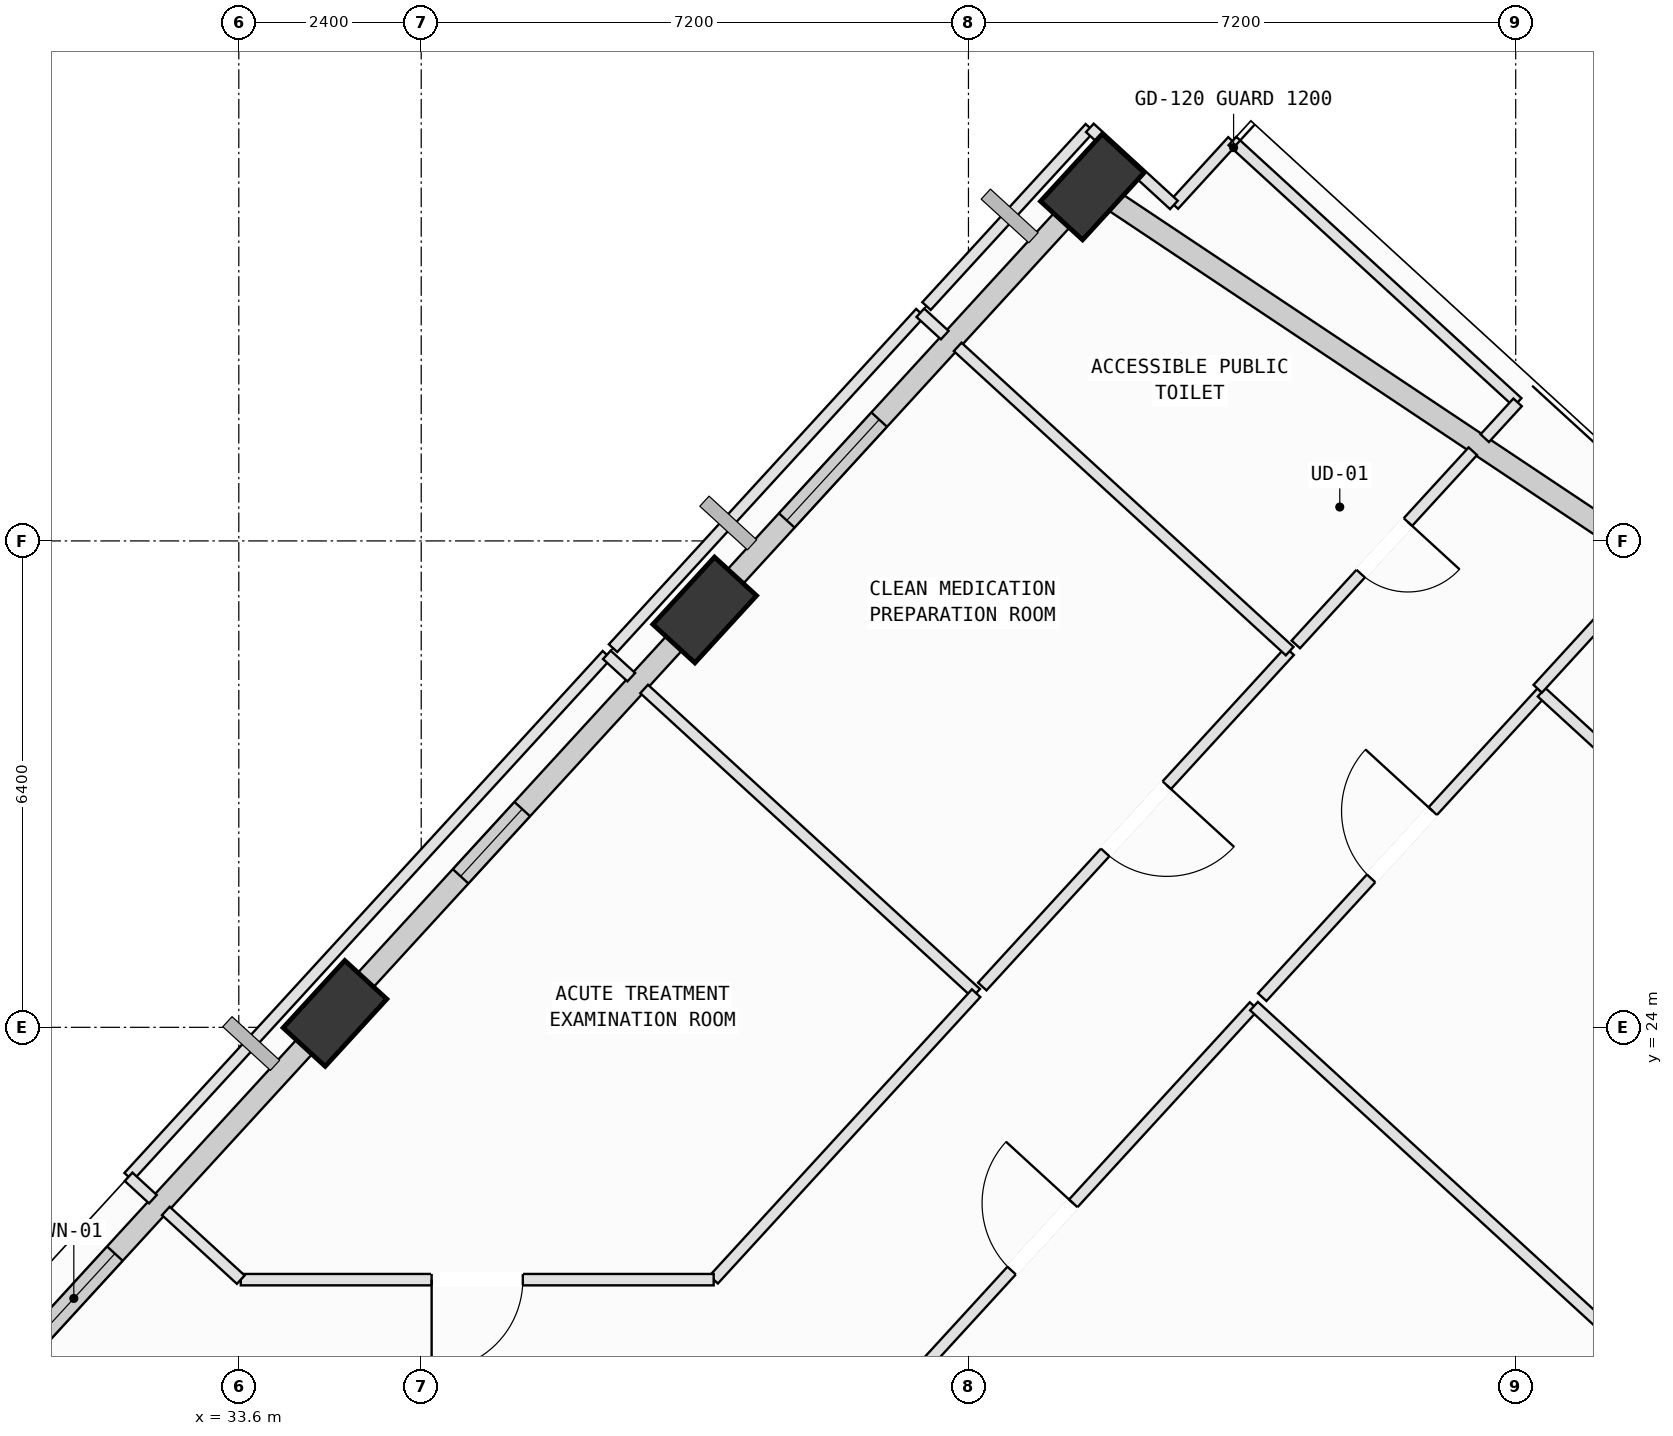
"""IFC4 building model, lengths in metres.
Left out: names, types, materials, properties, quantities, classifications, styles, units other than length and angle.
Written with IfcOpenShell. Run it as: python <this file> out.ifc"""

import sys

from ifc_helpers import new_model, si_unit, direction, frame, frame_2d, origin, origin_2d, place, context, subcontext, project, spatial, rectangle, extrude, element, fill, save


model = new_model("IFC4")
c1 = context("Model", 3, precision=1e-05, world=origin(), true_north=direction((0.0, 1.0)))
c2 = subcontext(c1, "Body", "Model", "MODEL_VIEW")
j1 = project(units=[si_unit("LENGTHUNIT", "METRE"), si_unit("PLANEANGLEUNIT", "RADIAN")], contexts=[c1])
p1 = place(None, origin())
s1 = spatial("IfcSite", under=j1, at=p1, CompositionType="ELEMENT")
p2 = place(p1, origin())
s2 = spatial("IfcBuilding", under=s1, at=p2, CompositionType="ELEMENT")
p3 = place(p2, frame((0.0, 0.0, 227.2)))
s3 = spatial("IfcBuildingStorey", under=s2, at=p3, CompositionType="ELEMENT", Elevation=227.2)
p4 = place(p3, frame((44.83, 35.058, 0.002), z_axis=(-0.042801019113, 0.046093405199, 0.998019774734), x_axis=(0.005619625487, -0.9989082731, 0.046375443311)))
e1 = element("IfcColumn", 1, at=p4, inside=s3, PredefinedType="COLUMN", context=c2, shape_type="SweptSolid", body=[
    extrude(rectangle(XDim=1.2, YDim=0.75, at=origin_2d()), origin(), (0.0, 0.0, 1.0), 4.004),
])
p5 = place(p3, frame((39.73, 29.491, 0.002), z_axis=(-0.019661240115, 0.02527873729, 0.999487078995), x_axis=(-0.080866298799, -0.996445261774, 0.023611056886)))
e2 = element("IfcColumn", 2, at=p5, inside=s3, PredefinedType="COLUMN", context=c2, shape_type="SweptSolid", body=[
    extrude(rectangle(XDim=1.2, YDim=0.75, at=origin_2d()), origin(), (0.0, 0.0, 1.0), 3.998),
])
p6 = place(p3, frame((34.865, 24.183, 0.002), z_axis=(0.002565781789, 0.005253743664, 0.999982907325), x_axis=(-0.930601204641, -0.366009310919, 0.004310712404)))
e3 = element("IfcColumn", 3, at=p6, inside=s3, PredefinedType="COLUMN", context=c2, shape_type="SweptSolid", body=[
    extrude(rectangle(XDim=1.2, YDim=0.75, at=origin_2d()), origin(), (0.0, 0.0, 1.0), 3.996),
])
p7 = place(p3, frame((45.058, 34.906, 0.0), z_axis=(0.0, 0.0, 1.0), x_axis=(0.831863197992, -0.554980738249, 0.0)))
e4 = element("IfcWall", 4, at=p7, inside=s3, PredefinedType="SOLIDWALL", context=c2, shape_type="SweptSolid", body=[
    extrude(rectangle(XDim=9.036, YDim=0.28, at=frame_2d((4.518, 0.0))), origin(), (0.0, 0.0, 1.0), 3.265),
])
p8 = place(p3, frame((40.002, 29.789, 0.0), z_axis=(0.0, 0.0, 1.0), x_axis=(0.675590903353, 0.737276699283, 0.0)))
e5 = element("IfcWall", 5, at=p8, inside=s3, PredefinedType="SOLIDWALL", context=c2, shape_type="SweptSolid", body=[
    extrude(rectangle(XDim=6.78, YDim=0.28, at=frame_2d((3.39, 0.0))), origin(), (0.0, 0.0, 1.0), 3.165),
])
p9 = place(p8, frame((1.195, 0.0, 0.75)))
e6 = element("IfcOpeningElement", 6, at=p9, cuts=e5, PredefinedType="OPENING", context=c2, shape_type="SweptSolid", body=[
    extrude(rectangle(XDim=1.8, YDim=2.05, at=frame_2d((0.9, 1.025))), frame((0.0, 0.15, 0.0), z_axis=(0.0, -1.0, 0.0), x_axis=(1.0, 0.0, 0.0)), (0.0, 0.0, 1.0), 0.3),
])
p10 = place(p3, frame((35.142, 24.484, 0.0), z_axis=(0.0, 0.0, 1.0), x_axis=(0.675579726408, 0.737286940931, 0.0)))
e7 = element("IfcWall", 7, at=p10, inside=s3, PredefinedType="SOLIDWALL", context=c2, shape_type="SweptSolid", body=[
    extrude(rectangle(XDim=6.409, YDim=0.28, at=frame_2d((3.205, 0.0))), origin(), (0.0, 0.0, 1.0), 3.265),
])
p11 = place(p10, frame((2.038, 0.0, 0.75)))
e8 = element("IfcOpeningElement", 8, at=p11, cuts=e7, PredefinedType="OPENING", context=c2, shape_type="SweptSolid", body=[
    extrude(rectangle(XDim=1.2, YDim=1.75, at=frame_2d((0.6, 0.875))), frame((0.0, 0.15, 0.0), z_axis=(0.0, -1.0, 0.0), x_axis=(1.0, 0.0, 0.0)), (0.0, 0.0, 1.0), 0.3),
])
p12 = place(p3, frame((30.444, 19.358, 0.0), z_axis=(0.0, 0.0, 1.0), x_axis=(0.675589973943, 0.737277550931, 0.0)))
e9 = element("IfcWall", 9, at=p12, inside=s3, PredefinedType="SOLIDWALL", context=c2, shape_type="SweptSolid", body=[
    extrude(rectangle(XDim=6.158, YDim=0.28, at=frame_2d((3.079, 0.0))), origin(), (0.0, 0.0, 1.0), 3.265),
])
p13 = place(p12, frame((0.658, 0.0, 0.75)))
e10 = element("IfcOpeningElement", 10, at=p13, cuts=e9, PredefinedType="OPENING", context=c2, shape_type="SweptSolid", body=[
    extrude(rectangle(XDim=1.6, YDim=1.95, at=frame_2d((0.8, 0.975))), frame((0.0, 0.15, 0.0), z_axis=(0.0, -1.0, 0.0), x_axis=(1.0, 0.0, 0.0)), (0.0, 0.0, 1.0), 0.3),
])
p14 = place(p3, frame((41.39, 18.204, 0.0), z_axis=(0.0, 0.0, 1.0), x_axis=(0.67562131305, 0.737248832724, 0.0)))
e11 = element("IfcWall", 11, at=p14, inside=s3, PredefinedType="PARTITIONING", context=c2, shape_type="SweptSolid", body=[
    extrude(rectangle(XDim=8.24, YDim=0.15, at=frame_2d((4.12, 0.0))), origin(), (0.0, 0.0, 1.0), 3.78),
])
p15 = place(p14, frame((3.52, 0.0, 0.0)))
e12 = element("IfcOpeningElement", 12, at=p15, cuts=e11, PredefinedType="OPENING", context=c2, shape_type="SweptSolid", body=[
    extrude(rectangle(XDim=1.2, YDim=2.15, at=frame_2d((0.6, 1.075))), frame((0.0, 0.085, 0.0), z_axis=(0.0, -1.0, 0.0), x_axis=(1.0, 0.0, 0.0)), (0.0, 0.0, 1.0), 0.17),
])
p16 = place(p3, frame((46.957, 24.279, 0.0), z_axis=(0.0, 0.0, 1.0), x_axis=(0.737309503426, -0.675555102237, 0.0)))
e13 = element("IfcWall", 13, at=p16, inside=s3, PredefinedType="PARTITIONING", context=c2, shape_type="SweptSolid", body=[
    extrude(rectangle(XDim=11.935, YDim=0.15, at=frame_2d((5.968, 0.0))), origin(), (0.0, 0.0, 1.0), 3.78),
])
p17 = place(p3, frame((47.065, 24.397, 0.0), z_axis=(0.0, 0.0, 1.0), x_axis=(0.675653505822, 0.737219329691, 0.0)))
e14 = element("IfcWall", 14, at=p17, inside=s3, PredefinedType="PARTITIONING", context=c2, shape_type="SweptSolid", body=[
    extrude(rectangle(XDim=5.441, YDim=0.15, at=frame_2d((2.72, 0.0))), origin(), (0.0, 0.0, 1.0), 3.78),
])
p18 = place(p17, frame((2.12, 0.0, 0.0)))
e15 = element("IfcOpeningElement", 15, at=p18, cuts=e14, PredefinedType="OPENING", context=c2, shape_type="SweptSolid", body=[
    extrude(rectangle(XDim=1.2, YDim=2.15, at=frame_2d((0.6, 1.075))), frame((0.0, 0.085, 0.0), z_axis=(0.0, -1.0, 0.0), x_axis=(1.0, 0.0, 0.0)), (0.0, 0.0, 1.0), 0.17),
])
p19 = place(p3, frame((50.741, 28.408, 0.0), z_axis=(0.0, 0.0, 1.0), x_axis=(0.737225137983, -0.675647168221, 0.0)))
e16 = element("IfcWall", 16, at=p19, inside=s3, PredefinedType="PARTITIONING", context=c2, shape_type="SweptSolid", body=[
    extrude(rectangle(XDim=10.134, YDim=0.15, at=frame_2d((5.067, 0.0))), origin(), (0.0, 0.0, 1.0), 3.78),
])
p20 = place(p19, frame((4.637, 0.0, 0.0)))
e17 = element("IfcOpeningElement", 17, at=p20, cuts=e16, PredefinedType="OPENING", context=c2, shape_type="SweptSolid", body=[
    extrude(rectangle(XDim=0.86, YDim=2.06, at=frame_2d((0.43, 1.03))), frame((0.0, 0.085, 0.0), z_axis=(0.0, -1.0, 0.0), x_axis=(1.0, 0.0, 0.0)), (0.0, 0.0, 1.0), 0.17),
])
p21 = place(p3, frame((32.15, 22.033, 0.0), z_axis=(0.0, 0.0, 1.0), x_axis=(0.675585759027, 0.737281413166, 0.0)))
e18 = element("IfcWall", 18, at=p21, inside=s3, PredefinedType="PARTITIONING", context=c2, shape_type="SweptSolid", body=[
    extrude(rectangle(XDim=9.315, YDim=0.15, at=frame_2d((4.658, 0.0))), origin(), (0.0, 0.0, 1.0), 3.78),
])
p22 = place(p3, frame((38.443, 28.901, 0.0), z_axis=(0.0, 0.0, 1.0), x_axis=(0.737293871703, -0.675572162504, 0.0)))
e19 = element("IfcWall", 19, at=p22, inside=s3, PredefinedType="PARTITIONING", context=c2, shape_type="SweptSolid", body=[
    extrude(rectangle(XDim=0.435, YDim=0.15, at=frame_2d((0.218, 0.0))), origin(), (0.0, 0.0, 1.0), 3.78),
])
p23 = place(p3, frame((38.933, 28.452, 0.0), z_axis=(0.0, 0.0, 1.0), x_axis=(0.737237948412, -0.675633189993, 0.0)))
e20 = element("IfcWall", 20, at=p23, inside=s3, PredefinedType="PARTITIONING", context=c2, shape_type="SweptSolid", body=[
    extrude(rectangle(XDim=5.925, YDim=0.15, at=frame_2d((2.962, 0.0))), origin(), (0.0, 0.0, 1.0), 3.78),
])
p24 = place(p3, frame((43.301, 24.449, 0.0), z_axis=(0.0, 0.0, 1.0), x_axis=(-0.675529956825, -0.737332541959, 0.0)))
e21 = element("IfcWall", 21, at=p24, inside=s3, PredefinedType="PARTITIONING", context=c2, shape_type="SweptSolid", body=[
    extrude(rectangle(XDim=5.112, YDim=0.15, at=frame_2d((2.556, 0.0))), origin(), (0.0, 0.0, 1.0), 3.78),
])
p25 = place(p3, frame((39.848, 20.68, 0.0), z_axis=(0.0, 0.0, 1.0), x_axis=(-1.0, 0.0, 0.0)))
e22 = element("IfcWall", 22, at=p25, inside=s3, PredefinedType="PARTITIONING", context=c2, shape_type="SweptSolid", body=[
    extrude(rectangle(XDim=6.222, YDim=0.15, at=frame_2d((3.111, 0.0))), origin(), (0.0, 0.0, 1.0), 3.78),
])
p26 = place(p25, frame((2.511, 0.0, 0.0)))
e23 = element("IfcOpeningElement", 23, at=p26, cuts=e22, PredefinedType="OPENING", context=c2, shape_type="SweptSolid", body=[
    extrude(rectangle(XDim=1.2, YDim=2.15, at=frame_2d((0.6, 1.075))), frame((0.0, 0.085, 0.0), z_axis=(0.0, -1.0, 0.0), x_axis=(1.0, 0.0, 0.0)), (0.0, 0.0, 1.0), 0.17),
])
p27 = place(p3, frame((33.626, 20.68, 0.0), z_axis=(0.0, 0.0, 1.0), x_axis=(-0.737101110808, 0.675782474207, 0.0)))
e24 = element("IfcWall", 24, at=p27, inside=s3, PredefinedType="PARTITIONING", context=c2, shape_type="SweptSolid", body=[
    extrude(rectangle(XDim=1.338, YDim=0.15, at=frame_2d((0.669, 0.0))), origin(), (0.0, 0.0, 1.0), 3.78),
])
p28 = place(p3, frame((32.47, 21.739, 0.0), z_axis=(0.0, 0.0, 1.0), x_axis=(-0.736524176438, 0.676411219246, 0.0)))
e25 = element("IfcWall", 25, at=p28, inside=s3, PredefinedType="PARTITIONING", context=c2, shape_type="SweptSolid", body=[
    extrude(rectangle(XDim=0.435, YDim=0.15, at=frame_2d((0.217, 0.0))), origin(), (0.0, 0.0, 1.0), 3.78),
])
p29 = place(p3, frame((47.426, 28.95, 0.0), z_axis=(0.0, 0.0, 1.0), x_axis=(-0.675619341334, -0.737250639617, 0.0)))
e26 = element("IfcWall", 26, at=p29, inside=s3, PredefinedType="PARTITIONING", context=c2, shape_type="SweptSolid", body=[
    extrude(rectangle(XDim=5.986, YDim=0.15, at=frame_2d((2.993, 0.0))), origin(), (0.0, 0.0, 1.0), 3.78),
])
p30 = place(p29, frame((2.393, 0.0, 0.0)))
e27 = element("IfcOpeningElement", 27, at=p30, cuts=e26, PredefinedType="OPENING", context=c2, shape_type="SweptSolid", body=[
    extrude(rectangle(XDim=1.2, YDim=2.15, at=frame_2d((0.6, 1.075))), frame((0.0, 0.085, 0.0), z_axis=(0.0, -1.0, 0.0), x_axis=(1.0, 0.0, 0.0)), (0.0, 0.0, 1.0), 0.17),
])
p31 = place(p3, frame((38.524, 28.989, 0.0), z_axis=(0.0, 0.0, 1.0), x_axis=(0.675510328169, 0.737350524878, 0.0)))
e28 = element("IfcWall", 28, at=p31, inside=s3, PredefinedType="PARTITIONING", context=c2, shape_type="SweptSolid", body=[
    extrude(rectangle(XDim=5.985, YDim=0.15, at=frame_2d((2.993, 0.0))), origin(), (0.0, 0.0, 1.0), 3.265),
])
p32 = place(p3, frame((42.567, 33.402, 0.0), z_axis=(0.0, 0.0, 1.0), x_axis=(0.737270493076, -0.675597676165, 0.0)))
e29 = element("IfcWall", 29, at=p32, inside=s3, PredefinedType="PARTITIONING", context=c2, shape_type="SweptSolid", body=[
    extrude(rectangle(XDim=0.436, YDim=0.15, at=frame_2d((0.218, 0.0))), origin(), (0.0, 0.0, 1.0), 3.78),
])
p33 = place(p3, frame((43.058, 32.953, 0.0), z_axis=(0.0, 0.0, 1.0), x_axis=(0.737237948412, -0.675633189993, 0.0)))
e30 = element("IfcWall", 30, at=p33, inside=s3, PredefinedType="PARTITIONING", context=c2, shape_type="SweptSolid", body=[
    extrude(rectangle(XDim=5.925, YDim=0.15, at=frame_2d((2.962, 0.0))), origin(), (0.0, 0.0, 1.0), 3.78),
])
p34 = place(p3, frame((45.903, 34.821, 0.0), z_axis=(0.0, 0.0, 1.0), x_axis=(0.675268831718, 0.737571694759, 0.0)))
e31 = element("IfcWall", 31, at=p34, inside=s3, PredefinedType="PARTITIONING", context=c2, shape_type="SweptSolid", body=[
    extrude(rectangle(XDim=1.14, YDim=0.15, at=frame_2d((0.57, 0.0))), origin(), (0.0, 0.0, 1.0), 3.78),
])
p35 = place(p3, frame((46.673, 35.662, 0.0), z_axis=(0.0, 0.0, 1.0), x_axis=(0.737162104538, -0.675715940046, 0.0)))
e32 = element("IfcWall", 32, at=p35, inside=s3, PredefinedType="PARTITIONING", context=c2, shape_type="SweptSolid", body=[
    extrude(rectangle(XDim=5.09, YDim=0.15, at=frame_2d((2.545, 0.0))), origin(), (0.0, 0.0, 1.0), 3.78),
])
p36 = place(p3, frame((50.425, 32.223, 0.0), z_axis=(0.0, 0.0, 1.0), x_axis=(-0.676087778805, -0.736821087748, 0.0)))
e33 = element("IfcWall", 33, at=p36, inside=s3, PredefinedType="PARTITIONING", context=c2, shape_type="SweptSolid", body=[
    extrude(rectangle(XDim=0.639, YDim=0.15, at=frame_2d((0.32, 0.0))), origin(), (0.0, 0.0, 1.0), 3.78),
])
p37 = place(p3, frame((49.836, 31.58, 0.0), z_axis=(0.0, 0.0, 1.0), x_axis=(-0.675519367859, -0.737342243227, 0.0)))
e34 = element("IfcWall", 34, at=p37, inside=s3, PredefinedType="PARTITIONING", context=c2, shape_type="SweptSolid", body=[
    extrude(rectangle(XDim=3.448, YDim=0.15, at=frame_2d((1.724, 0.0))), origin(), (0.0, 0.0, 1.0), 3.78),
])
p38 = place(p37, frame((1.264, 0.0, 0.0)))
e35 = element("IfcOpeningElement", 35, at=p38, cuts=e34, PredefinedType="OPENING", context=c2, shape_type="SweptSolid", body=[
    extrude(rectangle(XDim=0.92, YDim=2.1, at=frame_2d((0.46, 1.05))), frame((0.0, 0.085, 0.0), z_axis=(0.0, -1.0, 0.0), x_axis=(1.0, 0.0, 0.0)), (0.0, 0.0, 1.0), 0.17),
])
p39 = place(p3, frame((42.648, 33.49, 0.0), z_axis=(0.0, 0.0, 1.0), x_axis=(0.675658589074, 0.737214670914, 0.0)))
e36 = element("IfcWall", 36, at=p39, inside=s3, PredefinedType="PARTITIONING", context=c2, shape_type="SweptSolid", body=[
    extrude(rectangle(XDim=3.181, YDim=0.15, at=frame_2d((1.59, 0.0))), origin(), (0.0, 0.0, 1.0), 3.165),
])
p40 = place(p3, frame((44.797, 35.835, 0.0), z_axis=(0.0, 0.0, 1.0), x_axis=(0.737113612824, -0.67576883754, 0.0)))
e37 = element("IfcWall", 37, at=p40, inside=s3, PredefinedType="PARTITIONING", context=c2, shape_type="SweptSolid", body=[
    extrude(rectangle(XDim=1.5, YDim=0.15, at=frame_2d((0.75, 0.0))), origin(), (0.0, 0.0, 1.0), 3.265),
])
p41 = place(p3, frame((50.69, 28.455, 0.0), z_axis=(0.0, 0.0, 1.0), x_axis=(0.675560141792, 0.737304885934, 0.0)))
e38 = element("IfcWall", 38, at=p41, inside=s3, PredefinedType="PARTITIONING", context=c2, shape_type="SweptSolid", body=[
    extrude(rectangle(XDim=2.151, YDim=0.15, at=frame_2d((1.075, 0.0))), origin(), (0.0, 0.0, 1.0), 3.78),
])
p42 = place(p9, origin())
e39 = element("IfcWindow", 39, at=p42, inside=s3, PartitioningType="SINGLE_PANEL", PredefinedType="WINDOW", context=c2, shape_type="SweptSolid", body=[
    extrude(rectangle(XDim=1.8, YDim=2.05, at=frame_2d((0.9, 1.025))), frame((0.0, 0.03, 0.0), z_axis=(0.0, -1.0, 0.0), x_axis=(1.0, 0.0, 0.0)), (0.0, 0.0, 1.0), 0.06),
])
fill(e6, e39)
p43 = place(p11, origin())
e40 = element("IfcWindow", 40, at=p43, inside=s3, PartitioningType="SINGLE_PANEL", PredefinedType="WINDOW", context=c2, shape_type="SweptSolid", body=[
    extrude(rectangle(XDim=1.2, YDim=1.75, at=frame_2d((0.6, 0.875))), frame((0.0, 0.03, 0.0), z_axis=(0.0, -1.0, 0.0), x_axis=(1.0, 0.0, 0.0)), (0.0, 0.0, 1.0), 0.06),
])
fill(e8, e40)
p44 = place(p13, origin())
e41 = element("IfcWindow", 41, at=p44, inside=s3, PartitioningType="SINGLE_PANEL", PredefinedType="WINDOW", context=c2, shape_type="SweptSolid", body=[
    extrude(rectangle(XDim=1.6, YDim=1.95, at=frame_2d((0.8, 0.975))), frame((0.0, 0.03, 0.0), z_axis=(0.0, -1.0, 0.0), x_axis=(1.0, 0.0, 0.0)), (0.0, 0.0, 1.0), 0.06),
])
fill(e10, e41)
p45 = place(p15, origin())
e42 = element("IfcDoor", 42, at=p45, inside=s3, OperationType="SINGLE_SWING_RIGHT", PredefinedType="DOOR", context=c2, shape_type="SweptSolid", body=[
    extrude(rectangle(XDim=1.2, YDim=2.15, at=frame_2d((0.6, 1.075))), frame((0.0, 0.025, 0.0), z_axis=(0.0, -1.0, 0.0), x_axis=(1.0, 0.0, 0.0)), (0.0, 0.0, 1.0), 0.05),
])
fill(e12, e42)
p46 = place(p18, origin())
e43 = element("IfcDoor", 43, at=p46, inside=s3, OperationType="SINGLE_SWING_RIGHT", PredefinedType="DOOR", context=c2, shape_type="SweptSolid", body=[
    extrude(rectangle(XDim=1.2, YDim=2.15, at=frame_2d((0.6, 1.075))), frame((0.0, 0.025, 0.0), z_axis=(0.0, -1.0, 0.0), x_axis=(1.0, 0.0, 0.0)), (0.0, 0.0, 1.0), 0.05),
])
fill(e15, e43)
p47 = place(p26, origin())
e44 = element("IfcDoor", 44, at=p47, inside=s3, OperationType="SINGLE_SWING_RIGHT", PredefinedType="DOOR", context=c2, shape_type="SweptSolid", body=[
    extrude(rectangle(XDim=1.2, YDim=2.15, at=frame_2d((0.6, 1.075))), frame((0.0, 0.025, 0.0), z_axis=(0.0, -1.0, 0.0), x_axis=(1.0, 0.0, 0.0)), (0.0, 0.0, 1.0), 0.05),
])
fill(e23, e44)
p48 = place(p30, origin())
e45 = element("IfcDoor", 45, at=p48, inside=s3, OperationType="SINGLE_SWING_LEFT", PredefinedType="DOOR", context=c2, shape_type="SweptSolid", body=[
    extrude(rectangle(XDim=1.2, YDim=2.15, at=frame_2d((0.6, 1.075))), frame((0.0, 0.025, 0.0), z_axis=(0.0, -1.0, 0.0), x_axis=(1.0, 0.0, 0.0)), (0.0, 0.0, 1.0), 0.05),
])
fill(e27, e45)
p49 = place(p38, origin())
e46 = element("IfcDoor", 46, at=p49, inside=s3, OperationType="SINGLE_SWING_LEFT", PredefinedType="DOOR", context=c2, shape_type="SweptSolid", body=[
    extrude(rectangle(XDim=0.92, YDim=2.1, at=frame_2d((0.46, 1.05))), frame((0.0, 0.025, 0.0), z_axis=(0.0, -1.0, 0.0), x_axis=(1.0, 0.0, 0.0)), (0.0, 0.0, 1.0), 0.05),
])
fill(e35, e46)
save(model, sys.argv[1])
